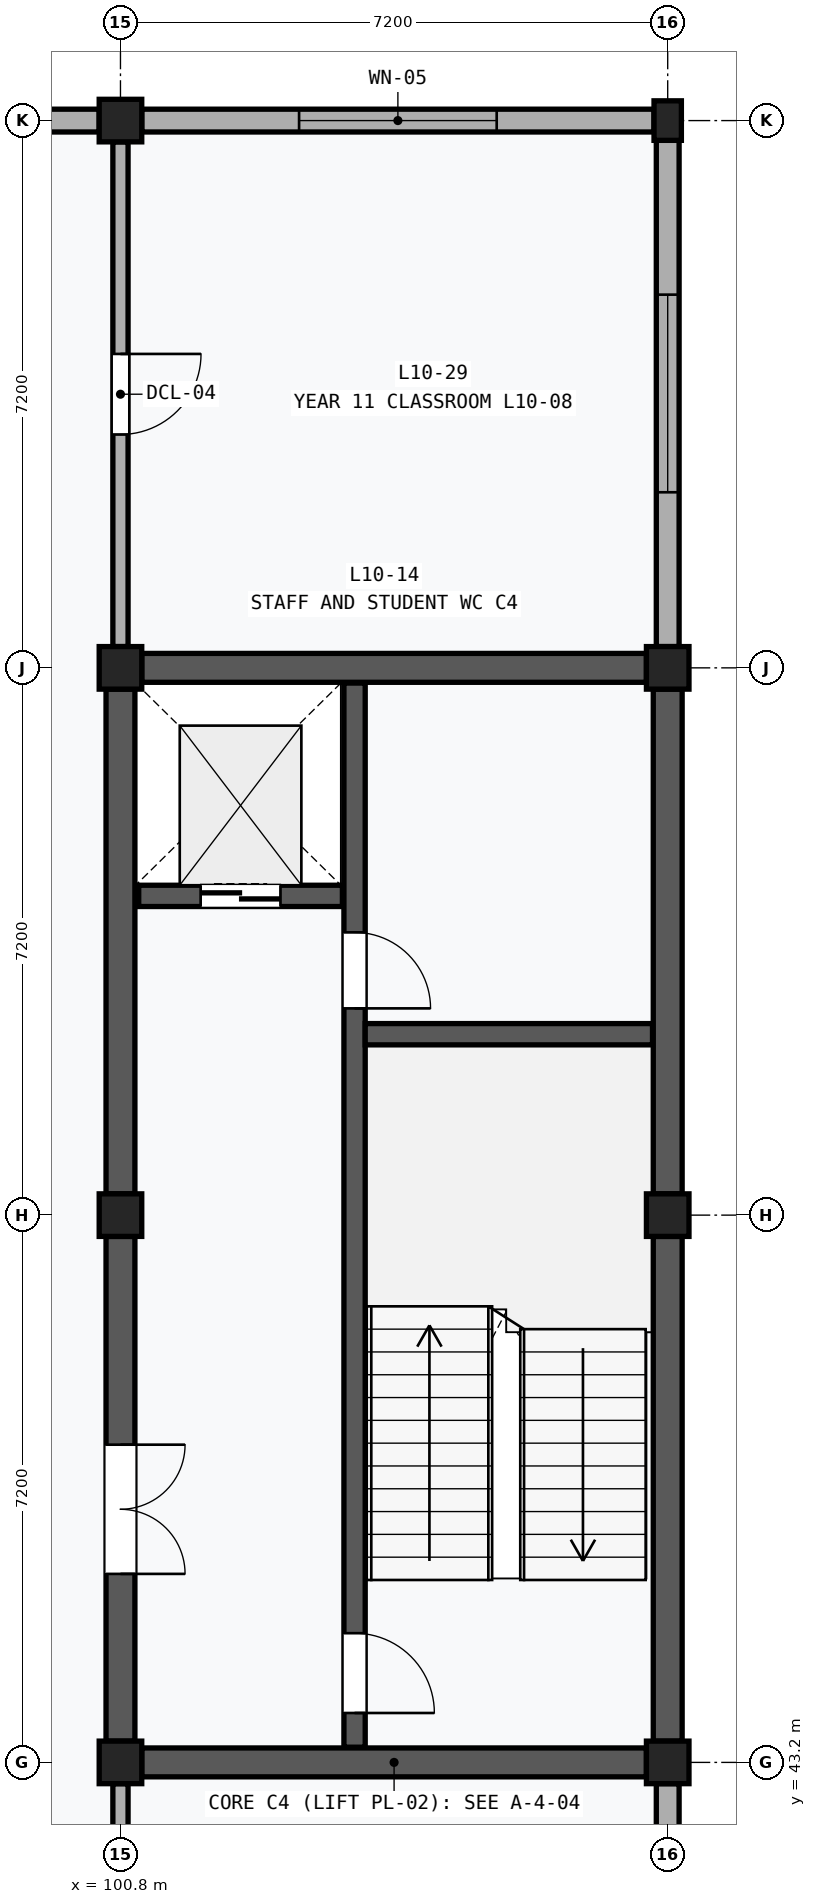
"""IFC4 building model, lengths in metres.
Left out: names, types, materials, properties, quantities, classifications, styles, units other than length and angle.
Written with IfcOpenShell. Run it as: python <this file> out.ifc"""

import sys

from ifc_helpers import new_model, si_unit, direction, frame, frame_2d, origin, origin_2d, place, context, subcontext, project, spatial, rectangle, extrude, element, fill, save


model = new_model("IFC4")
c1 = context("Model", 3, precision=1e-05, world=origin(), true_north=direction((0.0, 1.0)))
c2 = subcontext(c1, "Body", "Model", "MODEL_VIEW")
j1 = project(units=[si_unit("LENGTHUNIT", "METRE"), si_unit("PLANEANGLEUNIT", "RADIAN")], contexts=[c1])
p1 = place(None, origin())
s1 = spatial("IfcSite", under=j1, at=p1, CompositionType="ELEMENT")
p2 = place(p1, origin())
s2 = spatial("IfcBuilding", under=s1, at=p2, CompositionType="ELEMENT")
p3 = place(p2, frame((0.0, 0.0, 42.8)))
s3 = spatial("IfcBuildingStorey", under=s2, at=p3, CompositionType="ELEMENT", Elevation=42.8)
for number, where, z_axis, x_axis in (
    (1, (100.8, 43.2, 0.0), (0.0, 0.0, 1.0), (1.0, 0.0, 0.0)),
    (2, (100.8, 50.4, 0.0), (0.0, 0.0, 1.0), (1.0, 0.0, 0.0)),
    (3, (100.8, 57.6, 0.0), (0.0, 0.0, 1.0), (1.0, 0.0, 0.0)),
    (4, (100.8, 64.8, 0.0), (0.0, 0.0, 1.0), (1.0, 0.0, 0.0)),
    (5, (108.0, 43.2, 0.0), (0.0, 0.0, 1.0), (1.0, 0.0, 0.0)),
    (6, (108.0, 50.4, 0.0), (0.0, 0.0, 1.0), (1.0, 0.0, 0.0)),
    (7, (108.0, 57.6, 0.0), (0.0, 0.0, 1.0), (1.0, 0.0, 0.0)),
):
    element("IfcColumn", number, at=place(p3, frame(where, z_axis=z_axis, x_axis=x_axis)), inside=s3, PredefinedType="COLUMN", context=c2, shape_type="SweptSolid", body=[
        extrude(rectangle(XDim=0.56, YDim=0.56, at=origin_2d()), origin(), (0.0, 0.0, 1.0), 4.0),
    ])
p4 = place(p3, frame((108.0, 64.8, 0.0), z_axis=(0.0, 0.0, 1.0), x_axis=(1.0, 0.0, 0.0)))
e8 = element("IfcColumn", 8, at=p4, inside=s3, PredefinedType="PILASTER", context=c2, shape_type="SweptSolid", body=[
    extrude(rectangle(XDim=0.36, YDim=0.52, at=origin_2d()), origin(), (0.0, 0.0, 1.0), 4.0),
])
p5 = place(p3, frame((93.88, 64.8, 0.0), z_axis=(0.0, 0.0, 1.0), x_axis=(1.0, 0.0, 0.0)))
e9 = element("IfcWall", 9, at=p5, inside=s3, PredefinedType="SOLIDWALL", context=c2, shape_type="SweptSolid", body=[
    extrude(rectangle(XDim=6.64, YDim=0.3, at=frame_2d((3.32, 0.0))), origin(), (0.0, 0.0, 1.0), 3.18),
])
p6 = place(p5, frame((2.12, 0.0, 0.9)))
e10 = element("IfcOpeningElement", 10, at=p6, cuts=e9, PredefinedType="OPENING", context=c2, shape_type="SweptSolid", body=[
    extrude(rectangle(XDim=2.4, YDim=1.8, at=frame_2d((1.2, 0.9))), frame((0.0, 0.162, 0.0), z_axis=(0.0, -1.0, 0.0), x_axis=(1.0, 0.0, 0.0)), (0.0, 0.0, 1.0), 0.324),
])
p7 = place(p3, frame((108.0, 36.26, 0.0), z_axis=(0.0, 0.0, 1.0), x_axis=(0.0, 1.0, 0.0)))
e11 = element("IfcWall", 11, at=p7, inside=s3, PredefinedType="SOLIDWALL", context=c2, shape_type="SweptSolid", body=[
    extrude(rectangle(XDim=6.66, YDim=0.3, at=frame_2d((3.33, 0.0))), origin(), (0.0, 0.0, 1.0), 3.18),
])
p8 = place(p3, frame((101.08, 64.8, 0.0), z_axis=(0.0, 0.0, 1.0), x_axis=(1.0, 0.0, 0.0)))
e12 = element("IfcWall", 12, at=p8, inside=s3, PredefinedType="SOLIDWALL", context=c2, shape_type="SweptSolid", body=[
    extrude(rectangle(XDim=6.74, YDim=0.3, at=frame_2d((3.37, 0.0))), origin(), (0.0, 0.0, 1.0), 3.18),
])
p9 = place(p8, frame((2.07, 0.0, 0.9)))
e13 = element("IfcOpeningElement", 13, at=p9, cuts=e12, PredefinedType="OPENING", context=c2, shape_type="SweptSolid", body=[
    extrude(rectangle(XDim=2.6, YDim=1.8, at=frame_2d((1.3, 0.9))), frame((0.0, 0.162, 0.0), z_axis=(0.0, -1.0, 0.0), x_axis=(1.0, 0.0, 0.0)), (0.0, 0.0, 1.0), 0.324),
])
p10 = place(p3, frame((108.0, 57.88, 0.0), z_axis=(0.0, 0.0, 1.0), x_axis=(0.0, 1.0, 0.0)))
e14 = element("IfcWall", 14, at=p10, inside=s3, PredefinedType="SOLIDWALL", context=c2, shape_type="SweptSolid", body=[
    extrude(rectangle(XDim=6.66, YDim=0.3, at=frame_2d((3.33, 0.0))), origin(), (0.0, 0.0, 1.0), 3.18),
])
p11 = place(p10, frame((2.03, 0.0, 0.9)))
e15 = element("IfcOpeningElement", 15, at=p11, cuts=e14, PredefinedType="OPENING", context=c2, shape_type="SweptSolid", body=[
    extrude(rectangle(XDim=2.6, YDim=1.8, at=frame_2d((1.3, 0.9))), frame((0.0, 0.162, 0.0), z_axis=(0.0, -1.0, 0.0), x_axis=(1.0, 0.0, 0.0)), (0.0, 0.0, 1.0), 0.324),
])
p12 = place(p3, frame((100.8, 43.48, 0.0), z_axis=(0.0, 0.0, 1.0), x_axis=(0.0, 1.0, 0.0)))
e16 = element("IfcWall", 16, at=p12, inside=s3, PredefinedType="SHEAR", context=c2, shape_type="SweptSolid", body=[
    extrude(rectangle(XDim=6.64, YDim=0.38, at=frame_2d((3.32, 0.0))), origin(), (0.0, 0.0, 1.0), 3.02),
])
p13 = place(p12, frame((2.2, 0.0, 0.0)))
e17 = element("IfcOpeningElement", 17, at=p13, cuts=e16, PredefinedType="OPENING", context=c2, shape_type="SweptSolid", body=[
    extrude(rectangle(XDim=1.7, YDim=2.25, at=frame_2d((0.85, 1.125))), frame((0.0, 0.202, 0.0), z_axis=(0.0, -1.0, 0.0), x_axis=(1.0, 0.0, 0.0)), (0.0, 0.0, 1.0), 0.404),
])
p14 = place(p3, frame((100.8, 50.68, 0.0), z_axis=(0.0, 0.0, 1.0), x_axis=(0.0, 1.0, 0.0)))
e18 = element("IfcWall", 18, at=p14, inside=s3, PredefinedType="SHEAR", context=c2, shape_type="SweptSolid", body=[
    extrude(rectangle(XDim=6.64, YDim=0.38, at=frame_2d((3.32, 0.0))), origin(), (0.0, 0.0, 1.0), 3.02),
])
for number, where, z_axis, x_axis in (
    (19, (108.0, 43.48, 0.0), (0.0, 0.0, 1.0), (0.0, 1.0, 0.0)),
    (20, (108.0, 50.68, 0.0), (0.0, 0.0, 1.0), (0.0, 1.0, 0.0)),
):
    element("IfcWall", number, at=place(p3, frame(where, z_axis=z_axis, x_axis=x_axis)), inside=s3, PredefinedType="SHEAR", context=c2, shape_type="SweptSolid", body=[
        extrude(rectangle(XDim=6.64, YDim=0.38, at=frame_2d((3.32, 0.0))), origin(), (0.0, 0.0, 1.0), 3.18),
    ])
for number, where, z_axis, x_axis in (
    (21, (101.08, 43.2, 0.0), (0.0, 0.0, 1.0), (1.0, 0.0, 0.0)),
    (22, (101.08, 57.6, 0.0), (0.0, 0.0, 1.0), (1.0, 0.0, 0.0)),
):
    element("IfcWall", number, at=place(p3, frame(where, z_axis=z_axis, x_axis=x_axis)), inside=s3, PredefinedType="SHEAR", context=c2, shape_type="SweptSolid", body=[
        extrude(rectangle(XDim=6.64, YDim=0.38, at=frame_2d((3.32, 0.0))), origin(), (0.0, 0.0, 1.0), 3.02),
    ])
p15 = place(p3, frame((103.88, 43.4, 0.0), z_axis=(0.0, 0.0, 1.0), x_axis=(0.0, 1.0, 0.0)))
e23 = element("IfcWall", 23, at=p15, inside=s3, PredefinedType="SHEAR", context=c2, shape_type="SweptSolid", body=[
    extrude(rectangle(XDim=14.0, YDim=0.28, at=frame_2d((7.0, 0.0))), origin(), (0.0, 0.0, 1.0), 3.75),
])
p16 = place(p15, frame((0.45, 0.0, 0.0)))
e24 = element("IfcOpeningElement", 24, at=p16, cuts=e23, PredefinedType="OPENING", context=c2, shape_type="SweptSolid", body=[
    extrude(rectangle(XDim=1.05, YDim=2.15, at=frame_2d((0.525, 1.075))), frame((0.0, 0.152, 0.0), z_axis=(0.0, -1.0, 0.0), x_axis=(1.0, 0.0, 0.0)), (0.0, 0.0, 1.0), 0.304),
])
p17 = place(p15, frame((9.72, 0.0, 0.0)))
e25 = element("IfcOpeningElement", 25, at=p17, cuts=e23, PredefinedType="OPENING", context=c2, shape_type="SweptSolid", body=[
    extrude(rectangle(XDim=1.0, YDim=2.15, at=frame_2d((0.5, 1.075))), frame((0.0, 0.152, 0.0), z_axis=(0.0, -1.0, 0.0), x_axis=(1.0, 0.0, 0.0)), (0.0, 0.0, 1.0), 0.304),
])
p18 = place(p3, frame((104.02, 52.78, 0.0), z_axis=(0.0, 0.0, 1.0), x_axis=(1.0, 0.0, 0.0)))
e26 = element("IfcWall", 26, at=p18, inside=s3, PredefinedType="SHEAR", context=c2, shape_type="SweptSolid", body=[
    extrude(rectangle(XDim=3.78, YDim=0.28, at=frame_2d((1.89, 0.0))), origin(), (0.0, 0.0, 1.0), 3.75),
])
p19 = place(p3, frame((101.04, 54.6, 0.0), z_axis=(0.0, 0.0, 1.0), x_axis=(1.0, 0.0, 0.0)))
e27 = element("IfcWall", 27, at=p19, inside=s3, PredefinedType="SHEAR", context=c2, shape_type="SweptSolid", body=[
    extrude(rectangle(XDim=2.68, YDim=0.28, at=frame_2d((1.34, 0.0))), origin(), (0.0, 0.0, 1.0), 3.75),
])
p20 = place(p19, frame((0.815, 0.0, 0.0)))
e28 = element("IfcOpeningElement", 28, at=p20, cuts=e27, PredefinedType="OPENING", context=c2, shape_type="SweptSolid", body=[
    extrude(rectangle(XDim=1.05, YDim=2.2, at=frame_2d((0.525, 1.1))), frame((0.0, 0.152, 0.0), z_axis=(0.0, -1.0, 0.0), x_axis=(1.0, 0.0, 0.0)), (0.0, 0.0, 1.0), 0.304),
])
p21 = place(p3, frame((100.8, 36.28, 0.0), z_axis=(0.0, 0.0, 1.0), x_axis=(0.0, 1.0, 0.0)))
e29 = element("IfcWall", 29, at=p21, inside=s3, PredefinedType="PARTITIONING", context=c2, shape_type="SweptSolid", body=[
    extrude(rectangle(XDim=6.64, YDim=0.2, at=frame_2d((3.32, 0.0))), origin(), (0.0, 0.0, 1.0), 3.02),
])
p22 = place(p3, frame((100.8, 57.88, 0.0), z_axis=(0.0, 0.0, 1.0), x_axis=(0.0, 1.0, 0.0)))
e30 = element("IfcWall", 30, at=p22, inside=s3, PredefinedType="PARTITIONING", context=c2, shape_type="SweptSolid", body=[
    extrude(rectangle(XDim=6.64, YDim=0.2, at=frame_2d((3.32, 0.0))), origin(), (0.0, 0.0, 1.0), 3.02),
])
p23 = place(p22, frame((2.79, 0.0, 0.0)))
e31 = element("IfcOpeningElement", 31, at=p23, cuts=e30, PredefinedType="OPENING", context=c2, shape_type="SweptSolid", body=[
    extrude(rectangle(XDim=1.06, YDim=2.16, at=frame_2d((0.53, 1.08))), frame((0.0, 0.112, 0.0), z_axis=(0.0, -1.0, 0.0), x_axis=(1.0, 0.0, 0.0)), (0.0, 0.0, 1.0), 0.224),
])
p24 = place(p9, origin())
e32 = element("IfcWindow", 32, at=p24, inside=s3, PartitioningType="SINGLE_PANEL", PredefinedType="WINDOW", context=c2, shape_type="SweptSolid", body=[
    extrude(rectangle(XDim=2.6, YDim=1.8, at=frame_2d((1.3, 0.9))), frame((0.0, 0.03, 0.0), z_axis=(0.0, -1.0, 0.0), x_axis=(1.0, 0.0, 0.0)), (0.0, 0.0, 1.0), 0.06),
])
fill(e13, e32)
p25 = place(p11, origin())
e33 = element("IfcWindow", 33, at=p25, inside=s3, PartitioningType="SINGLE_PANEL", PredefinedType="WINDOW", context=c2, shape_type="SweptSolid", body=[
    extrude(rectangle(XDim=2.6, YDim=1.8, at=frame_2d((1.3, 0.9))), frame((0.0, 0.03, 0.0), z_axis=(0.0, -1.0, 0.0), x_axis=(1.0, 0.0, 0.0)), (0.0, 0.0, 1.0), 0.06),
])
fill(e15, e33)
p26 = place(p13, frame((1.7, 0.0, 0.0), z_axis=(0.0, 0.0, 1.0), x_axis=(-1.0, 0.0, 0.0)))
e34 = element("IfcDoor", 34, at=p26, inside=s3, OperationType="DOUBLE_DOOR_SINGLE_SWING", PredefinedType="DOOR", context=c2, shape_type="SweptSolid", body=[
    extrude(rectangle(XDim=1.7, YDim=2.25, at=frame_2d((0.85, 1.125))), frame((0.0, 0.025, 0.0), z_axis=(0.0, -1.0, 0.0), x_axis=(1.0, 0.0, 0.0)), (0.0, 0.0, 1.0), 0.05),
])
fill(e17, e34)
p27 = place(p16, frame((1.05, 0.0, 0.0), z_axis=(0.0, 0.0, 1.0), x_axis=(-1.0, 0.0, 0.0)))
e35 = element("IfcDoor", 35, at=p27, inside=s3, OperationType="SINGLE_SWING_RIGHT", PredefinedType="DOOR", context=c2, shape_type="SweptSolid", body=[
    extrude(rectangle(XDim=1.05, YDim=2.15, at=frame_2d((0.525, 1.075))), frame((0.0, 0.025, 0.0), z_axis=(0.0, -1.0, 0.0), x_axis=(1.0, 0.0, 0.0)), (0.0, 0.0, 1.0), 0.05),
])
fill(e24, e35)
p28 = place(p17, frame((1.0, 0.0, 0.0), z_axis=(0.0, 0.0, 1.0), x_axis=(-1.0, 0.0, 0.0)))
e36 = element("IfcDoor", 36, at=p28, inside=s3, OperationType="SINGLE_SWING_RIGHT", PredefinedType="DOOR", context=c2, shape_type="SweptSolid", body=[
    extrude(rectangle(XDim=1.0, YDim=2.15, at=frame_2d((0.5, 1.075))), frame((0.0, 0.025, 0.0), z_axis=(0.0, -1.0, 0.0), x_axis=(1.0, 0.0, 0.0)), (0.0, 0.0, 1.0), 0.05),
])
fill(e25, e36)
p29 = place(p20, frame((1.05, 0.0, 0.0), z_axis=(0.0, 0.0, 1.0), x_axis=(-1.0, 0.0, 0.0)))
e37 = element("IfcDoor", 37, at=p29, inside=s3, OperationType="DOUBLE_DOOR_SLIDING", PredefinedType="DOOR", context=c2, shape_type="SweptSolid", body=[
    extrude(rectangle(XDim=1.05, YDim=2.2, at=frame_2d((0.525, 1.1))), frame((0.0, 0.025, 0.0), z_axis=(0.0, -1.0, 0.0), x_axis=(1.0, 0.0, 0.0)), (0.0, 0.0, 1.0), 0.05),
])
fill(e28, e37)
p30 = place(p23, frame((1.06, 0.0, 0.0), z_axis=(0.0, 0.0, 1.0), x_axis=(-1.0, 0.0, 0.0)))
e38 = element("IfcDoor", 38, at=p30, inside=s3, OperationType="SINGLE_SWING_LEFT", PredefinedType="DOOR", context=c2, shape_type="SweptSolid", body=[
    extrude(rectangle(XDim=1.06, YDim=2.16, at=frame_2d((0.53, 1.08))), frame((0.0, 0.025, 0.0), z_axis=(0.0, -1.0, 0.0), x_axis=(1.0, 0.0, 0.0)), (0.0, 0.0, 1.0), 0.05),
])
fill(e31, e38)
save(model, sys.argv[1])
